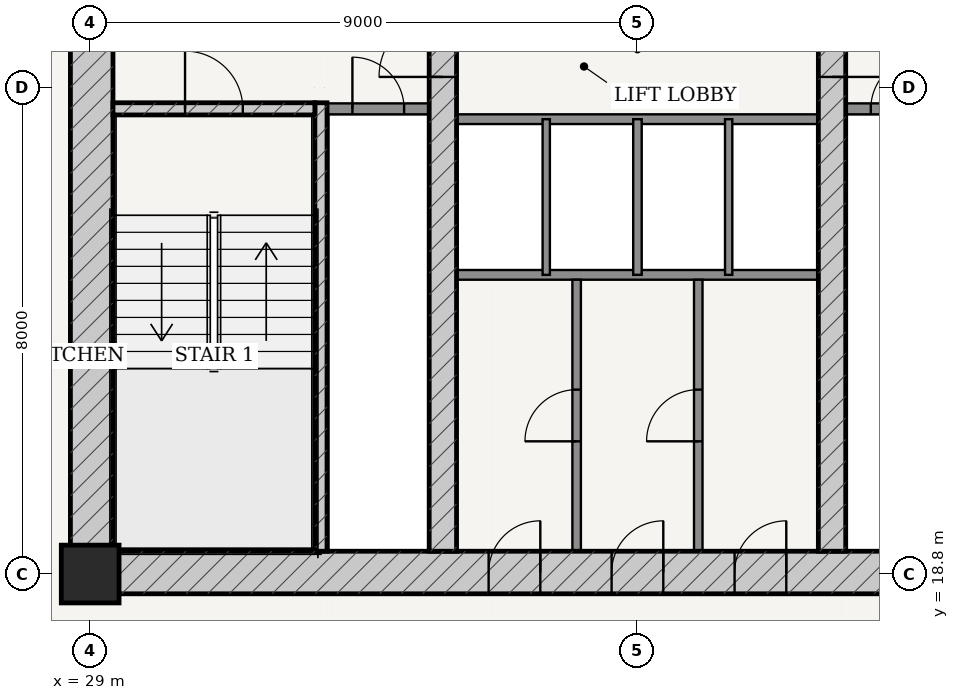
"""IFC4 building model, lengths in metres.
Left out: names, types, materials, properties, quantities, classifications, styles, units other than length and angle.
Written with IfcOpenShell. Run it as: python <this file> out.ifc"""

import sys

from ifc_helpers import new_model, si_unit, direction, frame, frame_2d, origin, origin_2d, place, context, subcontext, project, spatial, rectangle, extrude, source, transform, mapped, element, fill, save


model = new_model("IFC4")
c1 = context("Model", 3, precision=1e-05, world=origin(), true_north=direction((-0.2419218956, 0.970295726276)))
c2 = subcontext(c1, "Body", "Model", "MODEL_VIEW")
j1 = project(units=[si_unit("LENGTHUNIT", "METRE"), si_unit("PLANEANGLEUNIT", "RADIAN")], contexts=[c1])
p1 = place(None, origin())
s1 = spatial("IfcSite", under=j1, at=p1, CompositionType="ELEMENT")
p2 = place(p1, origin())
s2 = spatial("IfcBuilding", under=s1, at=p2, CompositionType="ELEMENT")
p3 = place(p2, frame((0.0, 0.0, 105.0)))
s3 = spatial("IfcBuildingStorey", under=s2, at=p3, CompositionType="ELEMENT", Elevation=105.0)
p4 = place(p3, frame((29.0, 18.8, 0.0), z_axis=(0.0, 0.0, 1.0), x_axis=(1.0, 0.0, 0.0)))
e1 = element("IfcColumn", 1, at=p4, inside=s3, PredefinedType="COLUMN", context=c2, shape_type="SweptSolid", body=[
    extrude(rectangle(XDim=0.95, YDim=0.95, at=origin_2d()), origin(), (0.0, 0.0, 1.0), 3.6),
])
p5 = place(p3, frame((28.675, 18.825, 0.0), z_axis=(0.0, 0.0, 1.0), x_axis=(1.0, 0.0, 0.0)))
e2 = element("IfcWall", 2, at=p5, inside=s3, PredefinedType="SHEAR", context=c2, shape_type="SweptSolid", body=[
    extrude(rectangle(XDim=18.65, YDim=0.7, at=frame_2d((9.325, 0.0))), origin(), (0.0, 0.0, 1.0), 3.325),
])
p6 = place(p5, frame((6.877, 0.0, 0.0)))
e3 = element("IfcOpeningElement", 3, at=p6, cuts=e2, PredefinedType="OPENING", context=c2, shape_type="SweptSolid", body=[
    extrude(rectangle(XDim=0.85, YDim=2.1, at=frame_2d((0.425, 1.05))), frame((0.0, 0.36, 0.0), z_axis=(0.0, -1.0, 0.0), x_axis=(1.0, 0.0, 0.0)), (0.0, 0.0, 1.0), 0.72),
])
p7 = place(p5, frame((8.9, 0.0, 0.0)))
e4 = element("IfcOpeningElement", 4, at=p7, cuts=e2, PredefinedType="OPENING", context=c2, shape_type="SweptSolid", body=[
    extrude(rectangle(XDim=0.85, YDim=2.1, at=frame_2d((0.425, 1.05))), frame((0.0, 0.36, 0.0), z_axis=(0.0, -1.0, 0.0), x_axis=(1.0, 0.0, 0.0)), (0.0, 0.0, 1.0), 0.72),
])
p8 = place(p5, frame((10.923, 0.0, 0.0)))
e5 = element("IfcOpeningElement", 5, at=p8, cuts=e2, PredefinedType="OPENING", context=c2, shape_type="SweptSolid", body=[
    extrude(rectangle(XDim=0.85, YDim=2.1, at=frame_2d((0.425, 1.05))), frame((0.0, 0.36, 0.0), z_axis=(0.0, -1.0, 0.0), x_axis=(1.0, 0.0, 0.0)), (0.0, 0.0, 1.0), 0.72),
])
p9 = place(p3, frame((29.025, 19.175, 0.0), z_axis=(0.0, 0.0, 1.0), x_axis=(0.0, 1.0, 0.0)))
e6 = element("IfcWall", 6, at=p9, inside=s3, PredefinedType="SHEAR", context=c2, shape_type="SweptSolid", body=[
    extrude(rectangle(XDim=15.25, YDim=0.7, at=frame_2d((7.625, 0.0))), origin(), (0.0, 0.0, 1.0), 3.325),
])
p10 = place(p9, frame((9.875, 0.0, 0.0)))
e7 = element("IfcOpeningElement", 7, at=p10, cuts=e6, PredefinedType="OPENING", context=c2, shape_type="SweptSolid", body=[
    extrude(rectangle(XDim=1.5, YDim=2.2, at=frame_2d((0.75, 1.1))), frame((0.0, 0.36, 0.0), z_axis=(0.0, -1.0, 0.0), x_axis=(1.0, 0.0, 0.0)), (0.0, 0.0, 1.0), 0.72),
])
p11 = place(p3, frame((32.795, 19.175, 0.0), z_axis=(0.0, 0.0, 1.0), x_axis=(0.0, 1.0, 0.0)))
e8 = element("IfcWall", 8, at=p11, inside=s3, PredefinedType="SOLIDWALL", context=c2, shape_type="SweptSolid", body=[
    extrude(rectangle(XDim=7.375, YDim=0.2, at=frame_2d((3.688, 0.0))), origin(), (0.0, 0.0, 1.0), 3.325),
])
p12 = place(p3, frame((29.375, 26.45, 0.0), z_axis=(0.0, 0.0, 1.0), x_axis=(1.0, 0.0, 0.0)))
e9 = element("IfcWall", 9, at=p12, inside=s3, PredefinedType="SOLIDWALL", context=c2, shape_type="SweptSolid", body=[
    extrude(rectangle(XDim=3.32, YDim=0.2, at=frame_2d((1.66, 0.0))), origin(), (0.0, 0.0, 1.0), 3.325),
])
p13 = place(p12, frame((1.185, 0.0, 0.0)))
e10 = element("IfcOpeningElement", 10, at=p13, cuts=e9, PredefinedType="OPENING", context=c2, shape_type="SweptSolid", body=[
    extrude(rectangle(XDim=0.95, YDim=2.15, at=frame_2d((0.475, 1.075))), frame((0.0, 0.11, 0.0), z_axis=(0.0, -1.0, 0.0), x_axis=(1.0, 0.0, 0.0)), (0.0, 0.0, 1.0), 0.22),
])
p14 = place(p3, frame((34.8, 19.175, 0.0), z_axis=(0.0, 0.0, 1.0), x_axis=(0.0, 1.0, 0.0)))
e11 = element("IfcWall", 11, at=p14, inside=s3, PredefinedType="SHEAR", context=c2, shape_type="SweptSolid", body=[
    extrude(rectangle(XDim=15.25, YDim=0.45, at=frame_2d((7.625, 0.0))), origin(), (0.0, 0.0, 1.0), 3.325),
])
p15 = place(p14, frame((7.8, 0.0, 0.0)))
e12 = element("IfcOpeningElement", 12, at=p15, cuts=e11, PredefinedType="OPENING", context=c2, shape_type="SweptSolid", body=[
    extrude(rectangle(XDim=1.05, YDim=2.15, at=frame_2d((0.525, 1.075))), frame((0.0, 0.235, 0.0), z_axis=(0.0, -1.0, 0.0), x_axis=(1.0, 0.0, 0.0)), (0.0, 0.0, 1.0), 0.47),
])
p16 = place(p3, frame((41.2, 19.175, 0.0), z_axis=(0.0, 0.0, 1.0), x_axis=(0.0, 1.0, 0.0)))
e13 = element("IfcWall", 13, at=p16, inside=s3, PredefinedType="SHEAR", context=c2, shape_type="SweptSolid", body=[
    extrude(rectangle(XDim=15.25, YDim=0.45, at=frame_2d((7.625, 0.0))), origin(), (0.0, 0.0, 1.0), 3.325),
])
p17 = place(p16, frame((7.8, 0.0, 0.0)))
e14 = element("IfcOpeningElement", 14, at=p17, cuts=e13, PredefinedType="OPENING", context=c2, shape_type="SweptSolid", body=[
    extrude(rectangle(XDim=1.05, YDim=2.15, at=frame_2d((0.525, 1.075))), frame((0.0, 0.235, 0.0), z_axis=(0.0, -1.0, 0.0), x_axis=(1.0, 0.0, 0.0)), (0.0, 0.0, 1.0), 0.47),
])
p18 = place(p3, frame((32.9, 26.45, 0.0), z_axis=(0.0, 0.0, 1.0), x_axis=(1.0, 0.0, 0.0)))
e15 = element("IfcWall", 15, at=p18, inside=s3, PredefinedType="PARTITIONING", context=c2, shape_type="SweptSolid", body=[
    extrude(rectangle(XDim=1.675, YDim=0.18, at=frame_2d((0.837, 0.0))), origin(), (0.0, 0.0, 1.0), 3.325),
])
p19 = place(p18, frame((0.413, 0.0, 0.0)))
e16 = element("IfcOpeningElement", 16, at=p19, cuts=e15, PredefinedType="OPENING", context=c2, shape_type="SweptSolid", body=[
    extrude(rectangle(XDim=0.85, YDim=2.1, at=frame_2d((0.425, 1.05))), frame((0.0, 0.1, 0.0), z_axis=(0.0, -1.0, 0.0), x_axis=(1.0, 0.0, 0.0)), (0.0, 0.0, 1.0), 0.2),
])
p20 = place(p3, frame((41.425, 26.45, 0.0), z_axis=(0.0, 0.0, 1.0), x_axis=(1.0, 0.0, 0.0)))
e17 = element("IfcWall", 17, at=p20, inside=s3, PredefinedType="PARTITIONING", context=c2, shape_type="SweptSolid", body=[
    extrude(rectangle(XDim=1.675, YDim=0.18, at=frame_2d((0.837, 0.0))), origin(), (0.0, 0.0, 1.0), 3.325),
])
p21 = place(p20, frame((0.413, 0.0, 0.0)))
e18 = element("IfcOpeningElement", 18, at=p21, cuts=e17, PredefinedType="OPENING", context=c2, shape_type="SweptSolid", body=[
    extrude(rectangle(XDim=0.85, YDim=2.1, at=frame_2d((0.425, 1.05))), frame((0.0, 0.1, 0.0), z_axis=(0.0, -1.0, 0.0), x_axis=(1.0, 0.0, 0.0)), (0.0, 0.0, 1.0), 0.2),
])
for number, where, z_axis, x_axis in (
    (19, (35.025, 26.28, 0.0), (0.0, 0.0, 1.0), (1.0, 0.0, 0.0)),
    (20, (35.025, 23.72, 0.0), (0.0, 0.0, 1.0), (1.0, 0.0, 0.0)),
):
    element("IfcWall", number, at=place(p3, frame(where, z_axis=z_axis, x_axis=x_axis)), inside=s3, PredefinedType="PARTITIONING", context=c2, shape_type="SweptSolid", body=[
        extrude(rectangle(XDim=5.95, YDim=0.16, at=frame_2d((2.975, 0.0))), origin(), (0.0, 0.0, 1.0), 3.325),
    ])
p22 = place(p3, frame((36.5, 23.72, 0.0), z_axis=(0.0, 0.0, 1.0), x_axis=(0.0, 1.0, 0.0)))
e21 = element("IfcWall", 21, at=p22, inside=s3, PredefinedType="PARTITIONING", context=c2, shape_type="SweptSolid", body=[
    extrude(rectangle(XDim=2.56, YDim=0.12, at=frame_2d((1.28, 0.0))), origin(), (0.0, 0.0, 1.0), 3.325),
])
p23 = place(p3, frame((38.0, 23.72, 0.0), z_axis=(0.0, 0.0, 1.0), x_axis=(0.0, 1.0, 0.0)))
e22 = element("IfcWall", 22, at=p23, inside=s3, PredefinedType="PARTITIONING", context=c2, shape_type="SweptSolid", body=[
    extrude(rectangle(XDim=2.56, YDim=0.14, at=frame_2d((1.28, 0.0))), origin(), (0.0, 0.0, 1.0), 3.325),
])
p24 = place(p3, frame((39.5, 23.72, 0.0), z_axis=(0.0, 0.0, 1.0), x_axis=(0.0, 1.0, 0.0)))
e23 = element("IfcWall", 23, at=p24, inside=s3, PredefinedType="PARTITIONING", context=c2, shape_type="SweptSolid", body=[
    extrude(rectangle(XDim=2.56, YDim=0.12, at=frame_2d((1.28, 0.0))), origin(), (0.0, 0.0, 1.0), 3.325),
])
p25 = place(p3, frame((37.0, 19.175, 0.0), z_axis=(0.0, 0.0, 1.0), x_axis=(0.0, 1.0, 0.0)))
e24 = element("IfcWall", 24, at=p25, inside=s3, PredefinedType="PARTITIONING", context=c2, shape_type="SweptSolid", body=[
    extrude(rectangle(XDim=4.465, YDim=0.14, at=frame_2d((2.232, 0.0))), origin(), (0.0, 0.0, 1.0), 3.325),
])
p26 = place(p25, frame((1.808, 0.0, 0.0)))
e25 = element("IfcOpeningElement", 25, at=p26, cuts=e24, PredefinedType="OPENING", context=c2, shape_type="SweptSolid", body=[
    extrude(rectangle(XDim=0.85, YDim=2.1, at=frame_2d((0.425, 1.05))), frame((0.0, 0.08, 0.0), z_axis=(0.0, -1.0, 0.0), x_axis=(1.0, 0.0, 0.0)), (0.0, 0.0, 1.0), 0.16),
])
p27 = place(p3, frame((39.0, 19.175, 0.0), z_axis=(0.0, 0.0, 1.0), x_axis=(0.0, 1.0, 0.0)))
e26 = element("IfcWall", 26, at=p27, inside=s3, PredefinedType="PARTITIONING", context=c2, shape_type="SweptSolid", body=[
    extrude(rectangle(XDim=4.465, YDim=0.14, at=frame_2d((2.232, 0.0))), origin(), (0.0, 0.0, 1.0), 3.325),
])
p28 = place(p27, frame((1.808, 0.0, 0.0)))
e27 = element("IfcOpeningElement", 27, at=p28, cuts=e26, PredefinedType="OPENING", context=c2, shape_type="SweptSolid", body=[
    extrude(rectangle(XDim=0.85, YDim=2.1, at=frame_2d((0.425, 1.05))), frame((0.0, 0.08, 0.0), z_axis=(0.0, -1.0, 0.0), x_axis=(1.0, 0.0, 0.0)), (0.0, 0.0, 1.0), 0.16),
])
m1 = source(origin(), c2, "Body", "SweptSolid", [
    extrude(rectangle(XDim=1.05, YDim=2.15, at=frame_2d((0.525, 1.075))), frame((0.0, 0.025, 0.0), z_axis=(0.0, -1.0, 0.0), x_axis=(1.0, 0.0, 0.0)), (0.0, 0.0, 1.0), 0.05),
])
p29 = place(p15, origin())
e28 = element("IfcDoor", 28, at=p29, inside=s3, OperationType="SINGLE_SWING_LEFT", PredefinedType="DOOR", context=c2, shape_type="MappedRepresentation", body=[
    mapped(m1, transform((0.0, 0.0, 0.0), scale=1.0)),
])
fill(e12, e28)
p30 = place(p17, frame((1.05, 0.0, 0.0), z_axis=(0.0, 0.0, 1.0), x_axis=(-1.0, 0.0, 0.0)))
e29 = element("IfcDoor", 29, at=p30, inside=s3, OperationType="SINGLE_SWING_RIGHT", PredefinedType="DOOR", context=c2, shape_type="MappedRepresentation", body=[
    mapped(m1, transform((0.0, 0.0, 0.0), scale=1.0)),
])
fill(e14, e29)
m2 = source(origin(), c2, "Body", "SweptSolid", [
    extrude(rectangle(XDim=0.95, YDim=2.15, at=frame_2d((0.475, 1.075))), frame((0.0, 0.025, 0.0), z_axis=(0.0, -1.0, 0.0), x_axis=(1.0, 0.0, 0.0)), (0.0, 0.0, 1.0), 0.05),
])
p31 = place(p13, origin())
e30 = element("IfcDoor", 30, at=p31, inside=s3, OperationType="SINGLE_SWING_LEFT", PredefinedType="DOOR", context=c2, shape_type="MappedRepresentation", body=[
    mapped(m2, transform((0.0, 0.0, 0.0), scale=1.0)),
])
fill(e10, e30)
m3 = source(origin(), c2, "Body", "SweptSolid", [
    extrude(rectangle(XDim=0.85, YDim=2.1, at=frame_2d((0.425, 1.05))), frame((0.0, 0.025, 0.0), z_axis=(0.0, -1.0, 0.0), x_axis=(1.0, 0.0, 0.0)), (0.0, 0.0, 1.0), 0.05),
])
p32 = place(p19, origin())
e31 = element("IfcDoor", 31, at=p32, inside=s3, OperationType="SINGLE_SWING_LEFT", PredefinedType="DOOR", context=c2, shape_type="MappedRepresentation", body=[
    mapped(m3, transform((0.0, 0.0, 0.0), scale=1.0)),
])
fill(e16, e31)
p33 = place(p21, origin())
e32 = element("IfcDoor", 32, at=p33, inside=s3, OperationType="SINGLE_SWING_RIGHT", PredefinedType="DOOR", context=c2, shape_type="MappedRepresentation", body=[
    mapped(m3, transform((0.0, 0.0, 0.0), scale=1.0)),
])
fill(e18, e32)
p34 = place(p6, origin())
e33 = element("IfcDoor", 33, at=p34, inside=s3, OperationType="SINGLE_SWING_RIGHT", PredefinedType="DOOR", context=c2, shape_type="MappedRepresentation", body=[
    mapped(m3, transform((0.0, 0.0, 0.0), scale=1.0)),
])
fill(e3, e33)
p35 = place(p7, origin())
e34 = element("IfcDoor", 34, at=p35, inside=s3, OperationType="SINGLE_SWING_RIGHT", PredefinedType="DOOR", context=c2, shape_type="MappedRepresentation", body=[
    mapped(m3, transform((0.0, 0.0, 0.0), scale=1.0)),
])
fill(e4, e34)
p36 = place(p8, origin())
e35 = element("IfcDoor", 35, at=p36, inside=s3, OperationType="SINGLE_SWING_RIGHT", PredefinedType="DOOR", context=c2, shape_type="MappedRepresentation", body=[
    mapped(m3, transform((0.0, 0.0, 0.0), scale=1.0)),
])
fill(e5, e35)
p37 = place(p26, origin())
e36 = element("IfcDoor", 36, at=p37, inside=s3, OperationType="SINGLE_SWING_LEFT", PredefinedType="DOOR", context=c2, shape_type="MappedRepresentation", body=[
    mapped(m3, transform((0.0, 0.0, 0.0), scale=1.0)),
])
fill(e25, e36)
p38 = place(p28, origin())
e37 = element("IfcDoor", 37, at=p38, inside=s3, OperationType="SINGLE_SWING_LEFT", PredefinedType="DOOR", context=c2, shape_type="MappedRepresentation", body=[
    mapped(m3, transform((0.0, 0.0, 0.0), scale=1.0)),
])
fill(e27, e37)
save(model, sys.argv[1])
